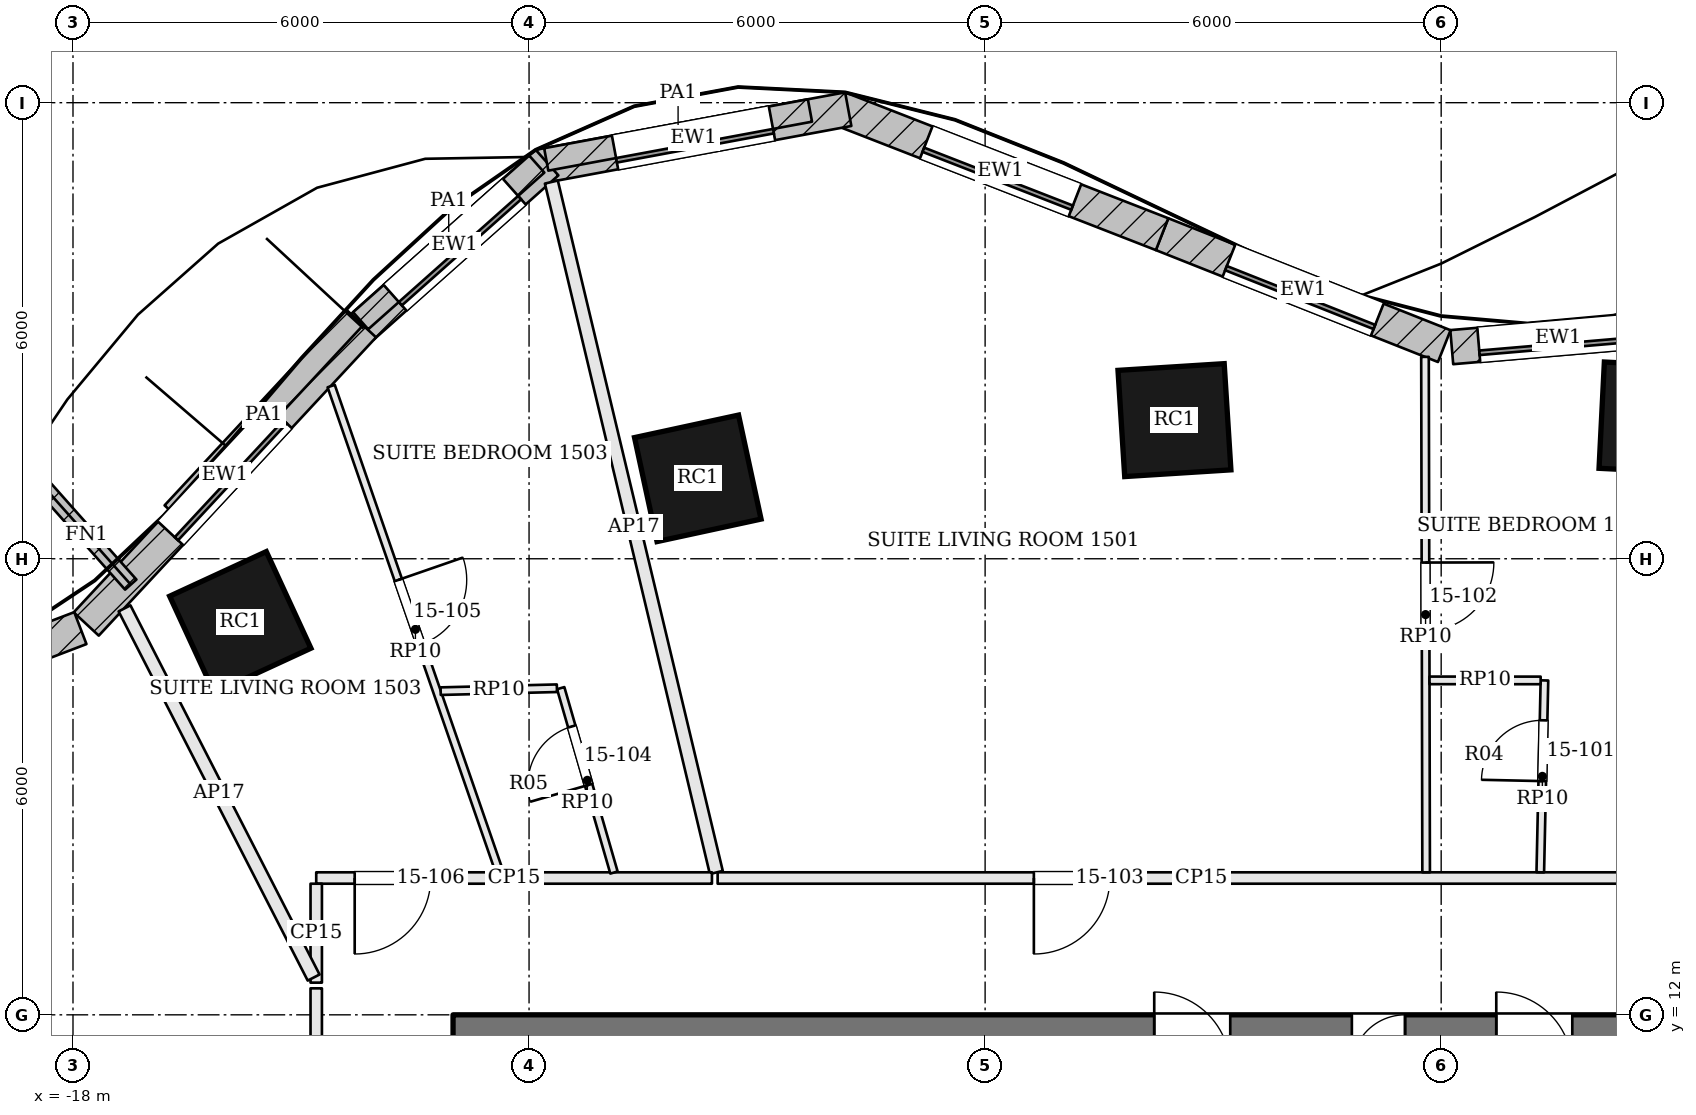
"""IFC4 building model, lengths in metres.
Left out: names, types, materials, properties, quantities, classifications, styles, units other than length and angle.
Written with IfcOpenShell. Run it as: python <this file> out.ifc"""

import sys

from ifc_helpers import new_model, si_unit, direction, frame, frame_2d, origin, origin_2d, place, context, subcontext, project, spatial, rectangle, extrude, element, fill, save


model = new_model("IFC4")
c1 = context("Model", 3, precision=1e-05, world=origin(), true_north=direction((0.0, 1.0)))
c2 = subcontext(c1, "Body", "Model", "MODEL_VIEW")
j1 = project(units=[si_unit("LENGTHUNIT", "METRE"), si_unit("PLANEANGLEUNIT", "RADIAN")], contexts=[c1])
p1 = place(None, origin())
s1 = spatial("IfcSite", under=j1, at=p1, CompositionType="ELEMENT")
p2 = place(p1, origin())
s2 = spatial("IfcBuilding", under=s1, at=p2, CompositionType="ELEMENT")
p3 = place(p2, frame((0.0, 0.0, 69.9)))
s3 = spatial("IfcBuildingStorey", under=s2, at=p3, CompositionType="ELEMENT", Elevation=69.9)
p4 = place(p3, frame((-13.0, 11.3, 0.0), z_axis=(0.0, 0.0, 1.0), x_axis=(1.0, 0.0, 0.0)))
e1 = element("IfcWall", 1, at=p4, inside=s3, PredefinedType="SHEAR", context=c2, shape_type="SweptSolid", body=[
    extrude(rectangle(XDim=26.0, YDim=1.4, at=frame_2d((13.0, 0.0))), origin(), (0.0, 0.0, 1.0), 3.6),
])
p5 = place(p4, frame((9.225, 0.0, 0.0)))
e2 = element("IfcOpeningElement", 2, at=p5, cuts=e1, PredefinedType="OPENING", context=c2, shape_type="SweptSolid", body=[
    extrude(rectangle(XDim=1.0, YDim=2.1, at=frame_2d((0.5, 1.05))), frame((0.0, 0.71, 0.0), z_axis=(0.0, -1.0, 0.0), x_axis=(1.0, 0.0, 0.0)), (0.0, 0.0, 1.0), 1.42),
])
p6 = place(p4, frame((11.825, 0.0, 0.0)))
e3 = element("IfcOpeningElement", 3, at=p6, cuts=e1, PredefinedType="OPENING", context=c2, shape_type="SweptSolid", body=[
    extrude(rectangle(XDim=0.7, YDim=2.1, at=frame_2d((0.35, 1.05))), frame((0.0, 0.71, 0.0), z_axis=(0.0, -1.0, 0.0), x_axis=(1.0, 0.0, 0.0)), (0.0, 0.0, 1.0), 1.42),
])
p7 = place(p4, frame((13.725, 0.0, 0.0)))
e4 = element("IfcOpeningElement", 4, at=p7, cuts=e1, PredefinedType="OPENING", context=c2, shape_type="SweptSolid", body=[
    extrude(rectangle(XDim=1.0, YDim=2.1, at=frame_2d((0.5, 1.05))), frame((0.0, 0.71, 0.0), z_axis=(0.0, -1.0, 0.0), x_axis=(1.0, 0.0, 0.0)), (0.0, 0.0, 1.0), 1.42),
])
p8 = place(p4, frame((16.225, 0.0, 0.0)))
e5 = element("IfcOpeningElement", 5, at=p8, cuts=e1, PredefinedType="OPENING", context=c2, shape_type="SweptSolid", body=[
    extrude(rectangle(XDim=0.9, YDim=2.1, at=frame_2d((0.45, 1.05))), frame((0.0, 0.71, 0.0), z_axis=(0.0, -1.0, 0.0), x_axis=(1.0, 0.0, 0.0)), (0.0, 0.0, 1.0), 1.42),
])
for number, where, z_axis, x_axis in (
    (6, (2.811, 19.854, 0.0), (0.0, 0.0, 1.0), (-0.999, 0.05, 0.0)),
    (7, (-3.509, 19.824, 0.0), (0.0, 0.0, 1.0), (-0.998, -0.063, 0.0)),
    (8, (-9.78, 19.058, 0.0), (0.0, 0.0, 1.0), (-0.977, -0.211, 0.0)),
    (9, (-15.799, 17.165, 0.0), (0.0, 0.0, 1.0), (-0.908, -0.419, 0.0)),
):
    element("IfcColumn", number, at=place(p3, frame(where, z_axis=z_axis, x_axis=x_axis)), inside=s3, PredefinedType="COLUMN", context=c2, shape_type="SweptSolid", body=[
        extrude(rectangle(XDim=1.4, YDim=1.4, at=origin_2d()), origin(), (0.0, 0.0, 1.0), 3.6),
    ])
p9 = place(p3, frame((2.942, 21.024, 0.0), z_axis=(0.0, 0.0, 1.0), x_axis=(-0.996362034459, -0.085221454389, 0.0)))
e10 = element("IfcWall", 10, at=p9, inside=s3, PredefinedType="SOLIDWALL", context=c2, shape_type="SweptSolid", body=[
    extrude(rectangle(XDim=2.813, YDim=0.45, at=frame_2d((1.407, 0.0))), origin(), (0.0, 0.0, 1.0), 3.4),
])
p10 = place(p9, frame((0.357, 0.0, 0.9)))
e11 = element("IfcOpeningElement", 11, at=p10, cuts=e10, PredefinedType="OPENING", context=c2, shape_type="SweptSolid", body=[
    extrude(rectangle(XDim=2.1, YDim=2.0, at=frame_2d((1.05, 1.0))), frame((0.0, 0.235, 0.0), z_axis=(0.0, -1.0, 0.0), x_axis=(1.0, 0.0, 0.0)), (0.0, 0.0, 1.0), 0.47),
])
p11 = place(p3, frame((0.041, 20.798, 0.0), z_axis=(0.0, 0.0, 1.0), x_axis=(-0.929539262027, 0.368723148649, 0.0)))
e12 = element("IfcWall", 12, at=p11, inside=s3, PredefinedType="SOLIDWALL", context=c2, shape_type="SweptSolid", body=[
    extrude(rectangle(XDim=3.995, YDim=0.45, at=frame_2d((1.997, 0.0))), origin(), (0.0, 0.0, 1.0), 3.4),
])
p12 = place(p11, frame((0.947, 0.0, 0.9)))
e13 = element("IfcOpeningElement", 13, at=p12, cuts=e12, PredefinedType="OPENING", context=c2, shape_type="SweptSolid", body=[
    extrude(rectangle(XDim=2.1, YDim=2.0, at=frame_2d((1.05, 1.0))), frame((0.0, 0.235, 0.0), z_axis=(0.0, -1.0, 0.0), x_axis=(1.0, 0.0, 0.0)), (0.0, 0.0, 1.0), 0.47),
])
p13 = place(p3, frame((-3.672, 22.27, 0.0), z_axis=(0.0, 0.0, 1.0), x_axis=(-0.931791503167, 0.36299393194, 0.0)))
e14 = element("IfcWall", 14, at=p13, inside=s3, PredefinedType="SOLIDWALL", context=c2, shape_type="SweptSolid", body=[
    extrude(rectangle(XDim=4.56, YDim=0.45, at=frame_2d((2.28, 0.0))), origin(), (0.0, 0.0, 1.0), 3.4),
])
p14 = place(p13, frame((1.23, 0.0, 0.9)))
e15 = element("IfcOpeningElement", 15, at=p14, cuts=e14, PredefinedType="OPENING", context=c2, shape_type="SweptSolid", body=[
    extrude(rectangle(XDim=2.1, YDim=2.0, at=frame_2d((1.05, 1.0))), frame((0.0, 0.235, 0.0), z_axis=(0.0, -1.0, 0.0), x_axis=(1.0, 0.0, 0.0)), (0.0, 0.0, 1.0), 0.47),
])
p15 = place(p3, frame((-7.801, 23.915, 0.0), z_axis=(0.0, 0.0, 1.0), x_axis=(-0.983186467795, -0.182604407242, 0.0)))
e16 = element("IfcWall", 16, at=p15, inside=s3, PredefinedType="SOLIDWALL", context=c2, shape_type="SweptSolid", body=[
    extrude(rectangle(XDim=4.141, YDim=0.45, at=frame_2d((2.07, 0.0))), origin(), (0.0, 0.0, 1.0), 3.4),
])
p16 = place(p15, frame((1.02, 0.0, 0.9)))
e17 = element("IfcOpeningElement", 17, at=p16, cuts=e16, PredefinedType="OPENING", context=c2, shape_type="SweptSolid", body=[
    extrude(rectangle(XDim=2.1, YDim=2.0, at=frame_2d((1.05, 1.0))), frame((0.0, 0.235, 0.0), z_axis=(0.0, -1.0, 0.0), x_axis=(1.0, 0.0, 0.0)), (0.0, 0.0, 1.0), 0.47),
])
p17 = place(p3, frame((-11.763, 23.212, 0.0), z_axis=(0.0, 0.0, 1.0), x_axis=(-0.74723528797, -0.664559571755, 0.0)))
e18 = element("IfcWall", 18, at=p17, inside=s3, PredefinedType="SOLIDWALL", context=c2, shape_type="SweptSolid", body=[
    extrude(rectangle(XDim=3.251, YDim=0.45, at=frame_2d((1.625, 0.0))), origin(), (0.0, 0.0, 1.0), 3.4),
])
p18 = place(p17, frame((0.576, 0.0, 0.9)))
e19 = element("IfcOpeningElement", 19, at=p18, cuts=e18, PredefinedType="OPENING", context=c2, shape_type="SweptSolid", body=[
    extrude(rectangle(XDim=2.1, YDim=2.0, at=frame_2d((1.05, 1.0))), frame((0.0, 0.235, 0.0), z_axis=(0.0, -1.0, 0.0), x_axis=(1.0, 0.0, 0.0)), (0.0, 0.0, 1.0), 0.47),
])
p19 = place(p3, frame((-14.177, 21.066, 0.0), z_axis=(0.0, 0.0, 1.0), x_axis=(-0.680847709714, -0.732425010617, 0.0)))
e20 = element("IfcWall", 20, at=p19, inside=s3, PredefinedType="SOLIDWALL", context=c2, shape_type="SweptSolid", body=[
    extrude(rectangle(XDim=5.358, YDim=0.45, at=frame_2d((2.679, 0.0))), origin(), (0.0, 0.0, 1.0), 3.4),
])
p20 = place(p19, frame((1.629, 0.0, 0.9)))
e21 = element("IfcOpeningElement", 21, at=p20, cuts=e20, PredefinedType="OPENING", context=c2, shape_type="SweptSolid", body=[
    extrude(rectangle(XDim=2.1, YDim=2.0, at=frame_2d((1.05, 1.0))), frame((0.0, 0.235, 0.0), z_axis=(0.0, -1.0, 0.0), x_axis=(1.0, 0.0, 0.0)), (0.0, 0.0, 1.0), 0.47),
])
p21 = place(p3, frame((-17.903, 17.087, 0.0), z_axis=(0.0, 0.0, 1.0), x_axis=(-0.934145554025, -0.356892258105, 0.0)))
e22 = element("IfcWall", 22, at=p21, inside=s3, PredefinedType="SOLIDWALL", context=c2, shape_type="SweptSolid", body=[
    extrude(rectangle(XDim=4.165, YDim=0.45, at=frame_2d((2.082, 0.0))), origin(), (0.0, 0.0, 1.0), 3.4),
])
p22 = place(p21, frame((1.182, 0.0, 0.9)))
e23 = element("IfcOpeningElement", 23, at=p22, cuts=e22, PredefinedType="OPENING", context=c2, shape_type="SweptSolid", body=[
    extrude(rectangle(XDim=1.8, YDim=2.0, at=frame_2d((0.9, 1.0))), frame((0.0, 0.235, 0.0), z_axis=(0.0, -1.0, 0.0), x_axis=(1.0, 0.0, 0.0)), (0.0, 0.0, 1.0), 0.47),
])
p23 = place(p3, frame((-17.24, 17.66, 0.0), z_axis=(0.0, 0.0, 1.0), x_axis=(-0.664017424016, 0.747717099312, 0.0)))
e24 = element("IfcWall", 24, at=p23, inside=s3, PredefinedType="SOLIDWALL", context=c2, shape_type="SweptSolid", body=[
    extrude(rectangle(XDim=1.75, YDim=0.2, at=frame_2d((0.875, 0.0))), origin(), (0.0, 0.0, 1.0), 3.4),
])
p24 = place(p3, frame((-8.304, 23.897, 3.6), z_axis=(0.0, 0.0, 1.0), x_axis=(-0.983203460001, -0.182512893356, 0.0)))
e25 = element("IfcWall", 25, at=p24, inside=s3, PredefinedType="PARAPET", context=c2, shape_type="SweptSolid", body=[
    extrude(rectangle(XDim=3.529, YDim=0.3, at=frame_2d((1.764, 0.0))), origin(), (0.0, 0.0, 1.0), 1.1),
])
p25 = place(p3, frame((-11.898, 23.192, 3.6), z_axis=(0.0, 0.0, 1.0), x_axis=(-0.74726596591, -0.664525075669, 0.0)))
e26 = element("IfcWall", 26, at=p25, inside=s3, PredefinedType="PARAPET", context=c2, shape_type="SweptSolid", body=[
    extrude(rectangle(XDim=3.101, YDim=0.3, at=frame_2d((1.551, 0.0))), origin(), (0.0, 0.0, 1.0), 1.1),
])
p26 = place(p3, frame((-14.293, 21.174, 3.6), z_axis=(0.0, 0.0, 1.0), x_axis=(-0.680821476217, -0.732449395877, 0.0)))
e27 = element("IfcWall", 27, at=p26, inside=s3, PredefinedType="PARAPET", context=c2, shape_type="SweptSolid", body=[
    extrude(rectangle(XDim=3.513, YDim=0.3, at=frame_2d((1.757, 0.0))), origin(), (0.0, 0.0, 1.0), 1.1),
])
p27 = place(p3, frame((3.209, 13.8, 0.0), z_axis=(0.0, 0.0, 1.0), x_axis=(-1.0, 0.0, 0.0)))
e28 = element("IfcWall", 28, at=p27, inside=s3, PredefinedType="PARTITIONING", context=c2, shape_type="SweptSolid", body=[
    extrude(rectangle(XDim=12.728, YDim=0.15, at=frame_2d((6.364, 0.0))), origin(), (0.0, 0.0, 1.0), 2.68),
])
p28 = place(p27, frame((7.568, 0.0, 0.0)))
e29 = element("IfcOpeningElement", 29, at=p28, cuts=e28, PredefinedType="OPENING", context=c2, shape_type="SweptSolid", body=[
    extrude(rectangle(XDim=1.0, YDim=2.1, at=frame_2d((0.5, 1.05))), frame((0.0, 0.085, 0.0), z_axis=(0.0, -1.0, 0.0), x_axis=(1.0, 0.0, 0.0)), (0.0, 0.0, 1.0), 0.17),
])
p29 = place(p3, frame((-11.707, 22.956, 0.0), z_axis=(0.0, 0.0, 1.0), x_axis=(0.232379145345, -0.972625278722, 0.0)))
e30 = element("IfcWall", 30, at=p29, inside=s3, PredefinedType="PARTITIONING", context=c2, shape_type="SweptSolid", body=[
    extrude(rectangle(XDim=9.339, YDim=0.175, at=frame_2d((4.669, 0.0))), origin(), (0.0, 0.0, 1.0), 2.68),
])
p30 = place(p3, frame((-9.594, 13.8, 0.0), z_axis=(0.0, 0.0, 1.0), x_axis=(-1.0, 0.0, 0.0)))
e31 = element("IfcWall", 31, at=p30, inside=s3, PredefinedType="PARTITIONING", context=c2, shape_type="SweptSolid", body=[
    extrude(rectangle(XDim=5.206, YDim=0.15, at=frame_2d((2.603, 0.0))), origin(), (0.0, 0.0, 1.0), 2.68),
])
p31 = place(p30, frame((3.7, 0.0, 0.0)))
e32 = element("IfcOpeningElement", 32, at=p31, cuts=e31, PredefinedType="OPENING", context=c2, shape_type="SweptSolid", body=[
    extrude(rectangle(XDim=1.0, YDim=2.1, at=frame_2d((0.5, 1.05))), frame((0.0, 0.085, 0.0), z_axis=(0.0, -1.0, 0.0), x_axis=(1.0, 0.0, 0.0)), (0.0, 0.0, 1.0), 0.17),
])
p32 = place(p3, frame((-14.8, 13.725, 0.0), z_axis=(0.0, 0.0, 1.0), x_axis=(0.0, -1.0, 0.0)))
e33 = element("IfcWall", 33, at=p32, inside=s3, PredefinedType="PARTITIONING", context=c2, shape_type="SweptSolid", body=[
    extrude(rectangle(XDim=1.302, YDim=0.15, at=frame_2d((0.651, 0.0))), origin(), (0.0, 0.0, 1.0), 2.68),
])
p33 = place(p3, frame((-17.322, 17.347, 0.0), z_axis=(0.0, 0.0, 1.0), x_axis=(0.45587154788, -0.890045578515, 0.0)))
e34 = element("IfcWall", 34, at=p33, inside=s3, PredefinedType="PARTITIONING", context=c2, shape_type="SweptSolid", body=[
    extrude(rectangle(XDim=5.457, YDim=0.175, at=frame_2d((2.729, 0.0))), origin(), (0.0, 0.0, 1.0), 2.68),
])
p34 = place(p3, frame((-14.8, 12.348, 0.0), z_axis=(0.0, 0.0, 1.0), x_axis=(0.0, -1.0, 0.0)))
e35 = element("IfcWall", 35, at=p34, inside=s3, PredefinedType="PARTITIONING", context=c2, shape_type="SweptSolid", body=[
    extrude(rectangle(XDim=1.741, YDim=0.15, at=frame_2d((0.871, 0.0))), origin(), (0.0, 0.0, 1.0), 2.68),
])
p35 = place(p3, frame((-0.213, 20.656, 0.0), z_axis=(0.0, 0.0, 1.0), x_axis=(0.002196214325, -0.999997588318, 0.0)))
e36 = element("IfcWall", 36, at=p35, inside=s3, PredefinedType="PARTITIONING", context=c2, shape_type="SweptSolid", body=[
    extrude(rectangle(XDim=6.781, YDim=0.1, at=frame_2d((3.391, 0.0))), origin(), (0.0, 0.0, 1.0), 2.898),
])
p36 = place(p35, frame((2.706, 0.0, 0.0)))
e37 = element("IfcOpeningElement", 37, at=p36, cuts=e36, PredefinedType="OPENING", context=c2, shape_type="SweptSolid", body=[
    extrude(rectangle(XDim=0.9, YDim=2.4, at=frame_2d((0.45, 1.2))), frame((0.0, 0.06, 0.0), z_axis=(0.0, -1.0, 0.0), x_axis=(1.0, 0.0, 0.0)), (0.0, 0.0, 1.0), 0.12),
])
p37 = place(p3, frame((1.304, 13.875, 0.0), z_axis=(0.0, 0.0, 1.0), x_axis=(0.02165836135, 0.99976543018, 0.0)))
e38 = element("IfcWall", 38, at=p37, inside=s3, PredefinedType="PARTITIONING", context=c2, shape_type="SweptSolid", body=[
    extrude(rectangle(XDim=2.525, YDim=0.1, at=frame_2d((1.262, 0.0))), origin(), (0.0, 0.0, 1.0), 2.898),
])
p38 = place(p37, frame((1.2, 0.0, 0.0)))
e39 = element("IfcOpeningElement", 39, at=p38, cuts=e38, PredefinedType="OPENING", context=c2, shape_type="SweptSolid", body=[
    extrude(rectangle(XDim=0.8, YDim=2.1, at=frame_2d((0.4, 1.05))), frame((0.0, 0.06, 0.0), z_axis=(0.0, -1.0, 0.0), x_axis=(1.0, 0.0, 0.0)), (0.0, 0.0, 1.0), 0.12),
])
p39 = place(p3, frame((1.309, 16.399, 0.0), z_axis=(0.0, 0.0, 1.0), x_axis=(-0.99999994424, 0.000333945548, 0.0)))
e40 = element("IfcWall", 40, at=p39, inside=s3, PredefinedType="PARTITIONING", context=c2, shape_type="SweptSolid", body=[
    extrude(rectangle(XDim=1.462, YDim=0.1, at=frame_2d((0.731, 0.0))), origin(), (0.0, 0.0, 1.0), 2.898),
])
p40 = place(p3, frame((-14.603, 20.272, 0.0), z_axis=(0.0, 0.0, 1.0), x_axis=(0.327245485349, -0.94493935907, 0.0)))
e41 = element("IfcWall", 41, at=p40, inside=s3, PredefinedType="PARTITIONING", context=c2, shape_type="SweptSolid", body=[
    extrude(rectangle(XDim=6.774, YDim=0.1, at=frame_2d((3.387, 0.0))), origin(), (0.0, 0.0, 1.0), 2.898),
])
p41 = place(p40, frame((2.699, 0.0, 0.0)))
e42 = element("IfcOpeningElement", 42, at=p41, cuts=e41, PredefinedType="OPENING", context=c2, shape_type="SweptSolid", body=[
    extrude(rectangle(XDim=0.9, YDim=2.4, at=frame_2d((0.45, 1.2))), frame((0.0, 0.06, 0.0), z_axis=(0.0, -1.0, 0.0), x_axis=(1.0, 0.0, 0.0)), (0.0, 0.0, 1.0), 0.12),
])
p42 = place(p3, frame((-10.883, 13.872, 0.0), z_axis=(0.0, 0.0, 1.0), x_axis=(-0.277503955304, 0.960724494739, 0.0)))
e43 = element("IfcWall", 43, at=p42, inside=s3, PredefinedType="PARTITIONING", context=c2, shape_type="SweptSolid", body=[
    extrude(rectangle(XDim=2.525, YDim=0.1, at=frame_2d((1.262, 0.0))), origin(), (0.0, 0.0, 1.0), 2.898),
])
p43 = place(p42, frame((1.2, 0.0, 0.0)))
e44 = element("IfcOpeningElement", 44, at=p43, cuts=e43, PredefinedType="OPENING", context=c2, shape_type="SweptSolid", body=[
    extrude(rectangle(XDim=0.8, YDim=2.1, at=frame_2d((0.4, 1.05))), frame((0.0, 0.06, 0.0), z_axis=(0.0, -1.0, 0.0), x_axis=(1.0, 0.0, 0.0)), (0.0, 0.0, 1.0), 0.12),
])
p44 = place(p3, frame((-11.634, 16.297, 0.0), z_axis=(0.0, 0.0, 1.0), x_axis=(-0.999682039253, -0.025215479279, 0.0)))
e45 = element("IfcWall", 45, at=p44, inside=s3, PredefinedType="PARTITIONING", context=c2, shape_type="SweptSolid", body=[
    extrude(rectangle(XDim=1.53, YDim=0.1, at=frame_2d((0.765, 0.0))), origin(), (0.0, 0.0, 1.0), 2.898),
])
p45 = place(p10, origin())
e46 = element("IfcWindow", 46, at=p45, inside=s3, PartitioningType="SINGLE_PANEL", PredefinedType="WINDOW", context=c2, shape_type="SweptSolid", body=[
    extrude(rectangle(XDim=2.1, YDim=2.0, at=frame_2d((1.05, 1.0))), frame((0.0, 0.135, 0.0), z_axis=(0.0, -1.0, 0.0), x_axis=(1.0, 0.0, 0.0)), (0.0, 0.0, 1.0), 0.06),
])
fill(e11, e46)
p46 = place(p12, origin())
e47 = element("IfcWindow", 47, at=p46, inside=s3, PartitioningType="SINGLE_PANEL", PredefinedType="WINDOW", context=c2, shape_type="SweptSolid", body=[
    extrude(rectangle(XDim=2.1, YDim=2.0, at=frame_2d((1.05, 1.0))), frame((0.0, 0.135, 0.0), z_axis=(0.0, -1.0, 0.0), x_axis=(1.0, 0.0, 0.0)), (0.0, 0.0, 1.0), 0.06),
])
fill(e13, e47)
p47 = place(p14, origin())
e48 = element("IfcWindow", 48, at=p47, inside=s3, PartitioningType="SINGLE_PANEL", PredefinedType="WINDOW", context=c2, shape_type="SweptSolid", body=[
    extrude(rectangle(XDim=2.1, YDim=2.0, at=frame_2d((1.05, 1.0))), frame((0.0, 0.135, 0.0), z_axis=(0.0, -1.0, 0.0), x_axis=(1.0, 0.0, 0.0)), (0.0, 0.0, 1.0), 0.06),
])
fill(e15, e48)
p48 = place(p16, origin())
e49 = element("IfcWindow", 49, at=p48, inside=s3, PartitioningType="SINGLE_PANEL", PredefinedType="WINDOW", context=c2, shape_type="SweptSolid", body=[
    extrude(rectangle(XDim=2.1, YDim=2.0, at=frame_2d((1.05, 1.0))), frame((0.0, 0.135, 0.0), z_axis=(0.0, -1.0, 0.0), x_axis=(1.0, 0.0, 0.0)), (0.0, 0.0, 1.0), 0.06),
])
fill(e17, e49)
p49 = place(p18, origin())
e50 = element("IfcWindow", 50, at=p49, inside=s3, PartitioningType="SINGLE_PANEL", PredefinedType="WINDOW", context=c2, shape_type="SweptSolid", body=[
    extrude(rectangle(XDim=2.1, YDim=2.0, at=frame_2d((1.05, 1.0))), frame((0.0, 0.135, 0.0), z_axis=(0.0, -1.0, 0.0), x_axis=(1.0, 0.0, 0.0)), (0.0, 0.0, 1.0), 0.06),
])
fill(e19, e50)
p50 = place(p20, origin())
e51 = element("IfcWindow", 51, at=p50, inside=s3, PartitioningType="SINGLE_PANEL", PredefinedType="WINDOW", context=c2, shape_type="SweptSolid", body=[
    extrude(rectangle(XDim=2.1, YDim=2.0, at=frame_2d((1.05, 1.0))), frame((0.0, 0.135, 0.0), z_axis=(0.0, -1.0, 0.0), x_axis=(1.0, 0.0, 0.0)), (0.0, 0.0, 1.0), 0.06),
])
fill(e21, e51)
p51 = place(p38, origin())
e52 = element("IfcDoor", 52, at=p51, inside=s3, OperationType="SINGLE_SWING_LEFT", PredefinedType="DOOR", context=c2, shape_type="SweptSolid", body=[
    extrude(rectangle(XDim=0.8, YDim=2.1, at=frame_2d((0.4, 1.05))), frame((0.0, 0.025, 0.0), z_axis=(0.0, -1.0, 0.0), x_axis=(1.0, 0.0, 0.0)), (0.0, 0.0, 1.0), 0.05),
])
fill(e39, e52)
p52 = place(p36, origin())
e53 = element("IfcDoor", 53, at=p52, inside=s3, OperationType="SINGLE_SWING_LEFT", PredefinedType="DOOR", context=c2, shape_type="SweptSolid", body=[
    extrude(rectangle(XDim=0.9, YDim=2.4, at=frame_2d((0.45, 1.2))), frame((0.0, 0.025, 0.0), z_axis=(0.0, -1.0, 0.0), x_axis=(1.0, 0.0, 0.0)), (0.0, 0.0, 1.0), 0.05),
])
fill(e37, e53)
p53 = place(p28, origin())
e54 = element("IfcDoor", 54, at=p53, inside=s3, OperationType="SINGLE_SWING_RIGHT", PredefinedType="DOOR", context=c2, shape_type="SweptSolid", body=[
    extrude(rectangle(XDim=1.0, YDim=2.1, at=frame_2d((0.5, 1.05))), frame((0.0, 0.025, 0.0), z_axis=(0.0, -1.0, 0.0), x_axis=(1.0, 0.0, 0.0)), (0.0, 0.0, 1.0), 0.05),
])
fill(e29, e54)
p54 = place(p43, origin())
e55 = element("IfcDoor", 55, at=p54, inside=s3, OperationType="SINGLE_SWING_LEFT", PredefinedType="DOOR", context=c2, shape_type="SweptSolid", body=[
    extrude(rectangle(XDim=0.8, YDim=2.1, at=frame_2d((0.4, 1.05))), frame((0.0, 0.025, 0.0), z_axis=(0.0, -1.0, 0.0), x_axis=(1.0, 0.0, 0.0)), (0.0, 0.0, 1.0), 0.05),
])
fill(e44, e55)
p55 = place(p41, origin())
e56 = element("IfcDoor", 56, at=p55, inside=s3, OperationType="SINGLE_SWING_LEFT", PredefinedType="DOOR", context=c2, shape_type="SweptSolid", body=[
    extrude(rectangle(XDim=0.9, YDim=2.4, at=frame_2d((0.45, 1.2))), frame((0.0, 0.025, 0.0), z_axis=(0.0, -1.0, 0.0), x_axis=(1.0, 0.0, 0.0)), (0.0, 0.0, 1.0), 0.05),
])
fill(e42, e56)
p56 = place(p31, origin())
e57 = element("IfcDoor", 57, at=p56, inside=s3, OperationType="SINGLE_SWING_RIGHT", PredefinedType="DOOR", context=c2, shape_type="SweptSolid", body=[
    extrude(rectangle(XDim=1.0, YDim=2.1, at=frame_2d((0.5, 1.05))), frame((0.0, 0.025, 0.0), z_axis=(0.0, -1.0, 0.0), x_axis=(1.0, 0.0, 0.0)), (0.0, 0.0, 1.0), 0.05),
])
fill(e32, e57)
save(model, sys.argv[1])
